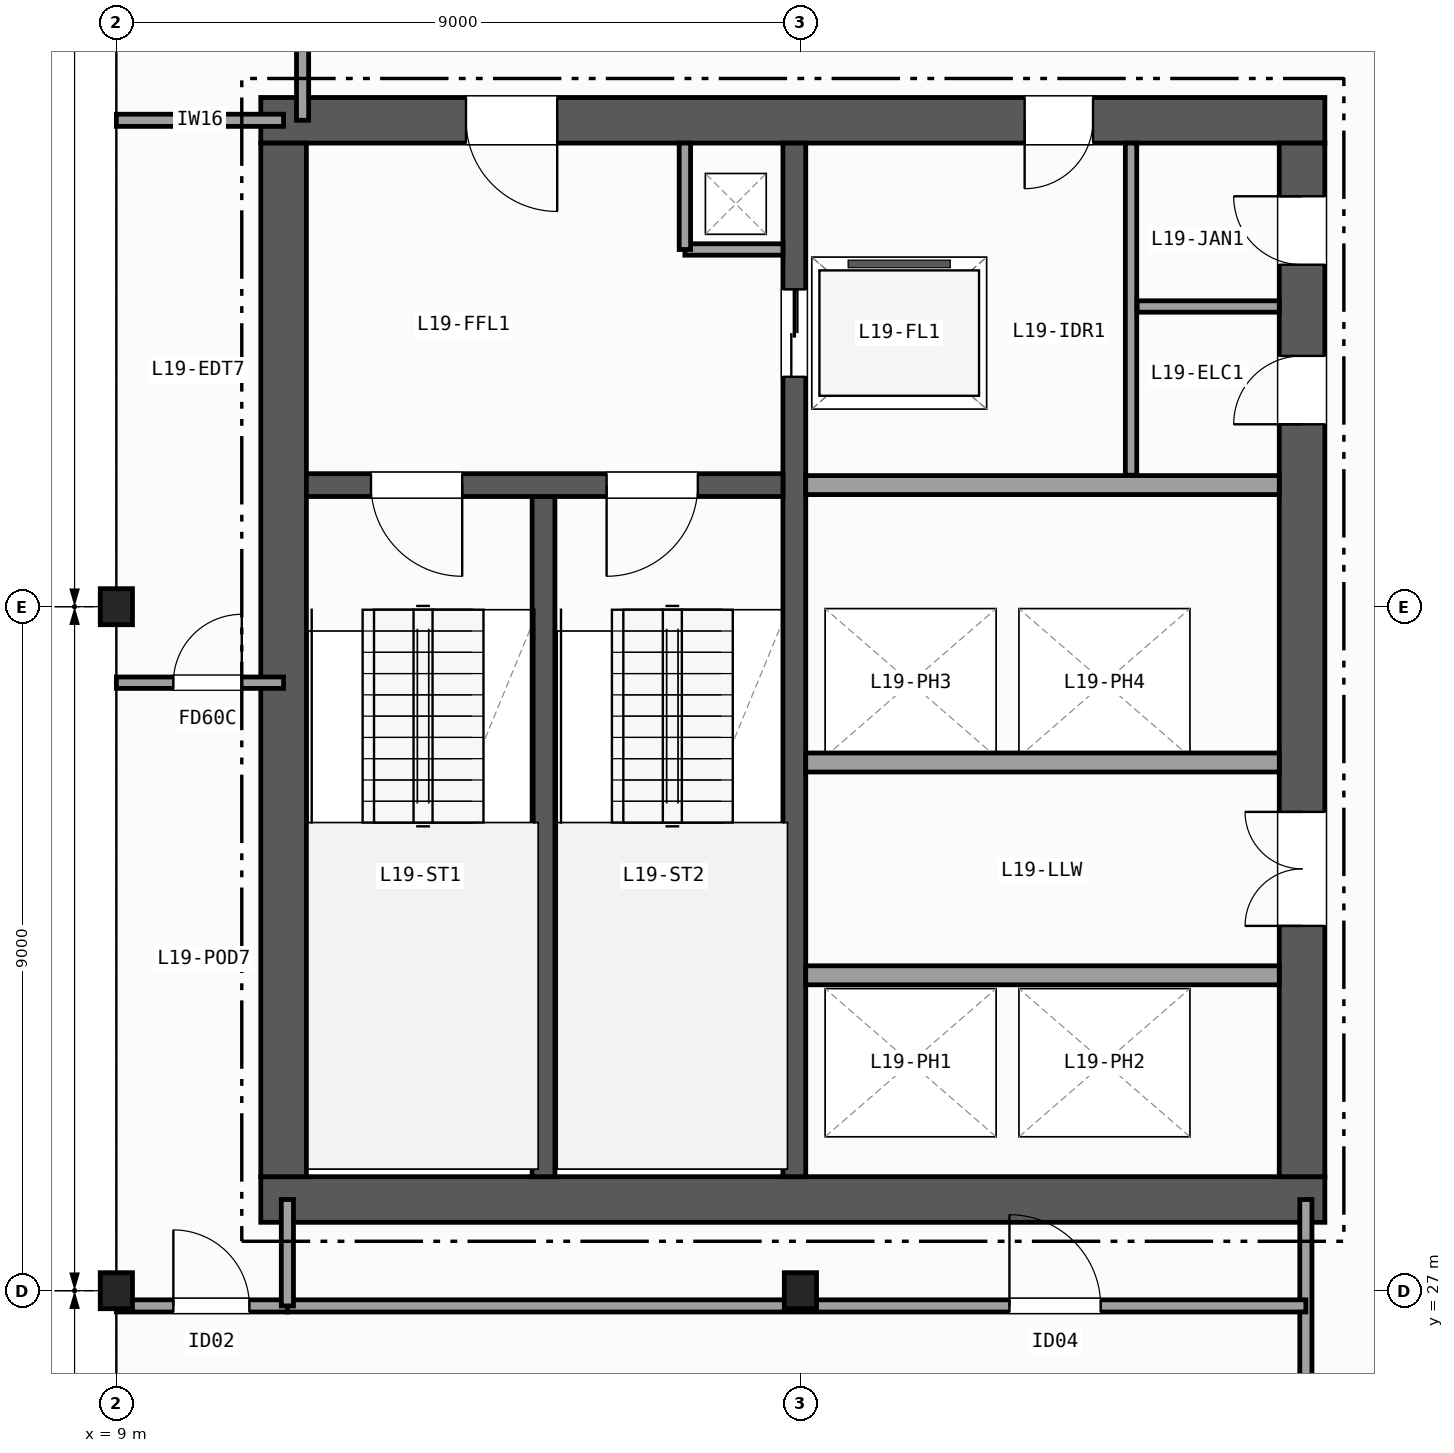
"""IFC4 building model, lengths in metres.
Left out: names, types, materials, properties, quantities, classifications, styles, units other than length and angle.
Written with IfcOpenShell. Run it as: python <this file> out.ifc"""

import sys

from ifc_helpers import new_model, si_unit, direction, frame, frame_2d, origin, origin_2d, place, context, subcontext, project, spatial, rectangle, i_section, extrude, element, fill, save


model = new_model("IFC4")
c1 = context("Model", 3, precision=1e-05, world=origin(), true_north=direction((0.0, 1.0)))
c2 = subcontext(c1, "Body", "Model", "MODEL_VIEW")
j1 = project(units=[si_unit("LENGTHUNIT", "METRE"), si_unit("PLANEANGLEUNIT", "RADIAN")], contexts=[c1])
p1 = place(None, origin())
s1 = spatial("IfcSite", under=j1, at=p1, CompositionType="ELEMENT")
p2 = place(p1, origin())
s2 = spatial("IfcBuilding", under=s1, at=p2, CompositionType="ELEMENT")
p3 = place(p2, frame((0.0, 0.0, 80.4)))
s3 = spatial("IfcBuildingStorey", under=s2, at=p3, CompositionType="ELEMENT", Elevation=80.4)
for number, where, z_axis, x_axis in (
    (1, (9.0, 27.0, 0.0), (0.0, 0.0, 1.0), (1.0, 0.0, 0.0)),
    (2, (9.0, 36.0, 0.0), (0.0, 0.0, 1.0), (1.0, 0.0, 0.0)),
    (3, (18.0, 27.0, 0.0), (0.0, 0.0, 1.0), (1.0, 0.0, 0.0)),
):
    element("IfcColumn", number, at=place(p3, frame(where, z_axis=z_axis, x_axis=x_axis)), inside=s3, PredefinedType="COLUMN", context=c2, shape_type="SweptSolid", body=[
        extrude(i_section(OverallWidth=0.424, OverallDepth=0.474, WebThickness=0.048, FlangeThickness=0.077, FilletRadius=0.015, at=origin_2d()), origin(), (0.0, 0.0, 1.0), 3.7),
    ])
p4 = place(p3, frame((10.9, 28.2, 0.0), z_axis=(0.0, 0.0, 1.0), x_axis=(1.0, 0.0, 0.0)))
e4 = element("IfcWall", 4, at=p4, inside=s3, PredefinedType="SHEAR", context=c2, shape_type="SweptSolid", body=[
    extrude(rectangle(XDim=14.0, YDim=0.6, at=frame_2d((7.0, 0.0))), origin(), (0.0, 0.0, 1.0), 3.37),
])
p5 = place(p3, frame((24.9, 42.4, 0.0), z_axis=(0.0, 0.0, 1.0), x_axis=(-1.0, 0.0, 0.0)))
e5 = element("IfcWall", 5, at=p5, inside=s3, PredefinedType="SHEAR", context=c2, shape_type="SweptSolid", body=[
    extrude(rectangle(XDim=14.0, YDim=0.6, at=frame_2d((7.0, 0.0))), origin(), (0.0, 0.0, 1.0), 3.37),
])
p6 = place(p5, frame((10.1, 0.0, 0.0)))
e6 = element("IfcOpeningElement", 6, at=p6, cuts=e5, PredefinedType="OPENING", context=c2, shape_type="SweptSolid", body=[
    extrude(rectangle(XDim=1.2, YDim=2.15, at=frame_2d((0.6, 1.075))), frame((0.0, 0.31, 0.0), z_axis=(0.0, -1.0, 0.0), x_axis=(1.0, 0.0, 0.0)), (0.0, 0.0, 1.0), 0.62),
])
p7 = place(p5, frame((3.05, 0.0, 0.0)))
e7 = element("IfcOpeningElement", 7, at=p7, cuts=e5, PredefinedType="OPENING", context=c2, shape_type="SweptSolid", body=[
    extrude(rectangle(XDim=0.9, YDim=2.1, at=frame_2d((0.45, 1.05))), frame((0.0, 0.31, 0.0), z_axis=(0.0, -1.0, 0.0), x_axis=(1.0, 0.0, 0.0)), (0.0, 0.0, 1.0), 0.62),
])
p8 = place(p3, frame((11.2, 42.1, 0.0), z_axis=(0.0, 0.0, 1.0), x_axis=(0.0, -1.0, 0.0)))
e8 = element("IfcWall", 8, at=p8, inside=s3, PredefinedType="SHEAR", context=c2, shape_type="SweptSolid", body=[
    extrude(rectangle(XDim=13.6, YDim=0.6, at=frame_2d((6.8, 0.0))), origin(), (0.0, 0.0, 1.0), 3.37),
])
p9 = place(p3, frame((24.6, 28.5, 0.0), z_axis=(0.0, 0.0, 1.0), x_axis=(0.0, 1.0, 0.0)))
e9 = element("IfcWall", 9, at=p9, inside=s3, PredefinedType="SHEAR", context=c2, shape_type="SweptSolid", body=[
    extrude(rectangle(XDim=13.6, YDim=0.6, at=frame_2d((6.8, 0.0))), origin(), (0.0, 0.0, 1.0), 3.37),
])
p10 = place(p9, frame((3.3, 0.0, 0.0)))
e10 = element("IfcOpeningElement", 10, at=p10, cuts=e9, PredefinedType="OPENING", context=c2, shape_type="SweptSolid", body=[
    extrude(rectangle(XDim=1.5, YDim=2.2, at=frame_2d((0.75, 1.1))), frame((0.0, 0.31, 0.0), z_axis=(0.0, -1.0, 0.0), x_axis=(1.0, 0.0, 0.0)), (0.0, 0.0, 1.0), 0.62),
])
p11 = place(p9, frame((9.9, 0.0, 0.0)))
e11 = element("IfcOpeningElement", 11, at=p11, cuts=e9, PredefinedType="OPENING", context=c2, shape_type="SweptSolid", body=[
    extrude(rectangle(XDim=0.9, YDim=2.1, at=frame_2d((0.45, 1.05))), frame((0.0, 0.31, 0.0), z_axis=(0.0, -1.0, 0.0), x_axis=(1.0, 0.0, 0.0)), (0.0, 0.0, 1.0), 0.62),
])
p12 = place(p9, frame((12.0, 0.0, 0.0)))
e12 = element("IfcOpeningElement", 12, at=p12, cuts=e9, PredefinedType="OPENING", context=c2, shape_type="SweptSolid", body=[
    extrude(rectangle(XDim=0.9, YDim=2.1, at=frame_2d((0.45, 1.05))), frame((0.0, 0.31, 0.0), z_axis=(0.0, -1.0, 0.0), x_axis=(1.0, 0.0, 0.0)), (0.0, 0.0, 1.0), 0.62),
])
p13 = place(p3, frame((14.62, 28.5, 0.0), z_axis=(0.0, 0.0, 1.0), x_axis=(0.0, 1.0, 0.0)))
e13 = element("IfcWall", 13, at=p13, inside=s3, PredefinedType="SHEAR", context=c2, shape_type="SweptSolid", body=[
    extrude(rectangle(XDim=8.95, YDim=0.3, at=frame_2d((4.475, 0.0))), origin(), (0.0, 0.0, 1.0), 3.37),
])
p14 = place(p3, frame((17.92, 42.1, 0.0), z_axis=(0.0, 0.0, 1.0), x_axis=(0.0, -1.0, 0.0)))
e14 = element("IfcWall", 14, at=p14, inside=s3, PredefinedType="SHEAR", context=c2, shape_type="SweptSolid", body=[
    extrude(rectangle(XDim=13.6, YDim=0.3, at=frame_2d((6.8, 0.0))), origin(), (0.0, 0.0, 1.0), 3.37),
])
p15 = place(p14, frame((1.925, 0.0, 0.0)))
e15 = element("IfcOpeningElement", 15, at=p15, cuts=e14, PredefinedType="OPENING", context=c2, shape_type="SweptSolid", body=[
    extrude(rectangle(XDim=1.15, YDim=2.15, at=frame_2d((0.575, 1.075))), frame((0.0, 0.16, 0.0), z_axis=(0.0, -1.0, 0.0), x_axis=(1.0, 0.0, 0.0)), (0.0, 0.0, 1.0), 0.32),
])
p16 = place(p3, frame((17.77, 37.6, 0.0), z_axis=(0.0, 0.0, 1.0), x_axis=(-1.0, 0.0, 0.0)))
e16 = element("IfcWall", 16, at=p16, inside=s3, PredefinedType="SHEAR", context=c2, shape_type="SweptSolid", body=[
    extrude(rectangle(XDim=6.27, YDim=0.3, at=frame_2d((3.135, 0.0))), origin(), (0.0, 0.0, 1.0), 3.37),
])
p17 = place(p16, frame((4.22, 0.0, 0.0)))
e17 = element("IfcOpeningElement", 17, at=p17, cuts=e16, PredefinedType="OPENING", context=c2, shape_type="SweptSolid", body=[
    extrude(rectangle(XDim=1.2, YDim=2.15, at=frame_2d((0.6, 1.075))), frame((0.0, 0.16, 0.0), z_axis=(0.0, -1.0, 0.0), x_axis=(1.0, 0.0, 0.0)), (0.0, 0.0, 1.0), 0.32),
])
p18 = place(p16, frame((1.12, 0.0, 0.0)))
e18 = element("IfcOpeningElement", 18, at=p18, cuts=e16, PredefinedType="OPENING", context=c2, shape_type="SweptSolid", body=[
    extrude(rectangle(XDim=1.2, YDim=2.15, at=frame_2d((0.6, 1.075))), frame((0.0, 0.16, 0.0), z_axis=(0.0, -1.0, 0.0), x_axis=(1.0, 0.0, 0.0)), (0.0, 0.0, 1.0), 0.32),
])
p19 = place(p3, frame((16.48, 40.7, 0.0), z_axis=(0.0, 0.0, 1.0), x_axis=(1.0, 0.0, 0.0)))
e19 = element("IfcWall", 19, at=p19, inside=s3, PredefinedType="PARTITIONING", context=c2, shape_type="SweptSolid", body=[
    extrude(rectangle(XDim=1.29, YDim=0.15, at=frame_2d((0.645, 0.0))), origin(), (0.0, 0.0, 1.0), 3.37),
])
p20 = place(p3, frame((16.48, 40.7, 0.0), z_axis=(0.0, 0.0, 1.0), x_axis=(0.0, 1.0, 0.0)))
e20 = element("IfcWall", 20, at=p20, inside=s3, PredefinedType="PARTITIONING", context=c2, shape_type="SweptSolid", body=[
    extrude(rectangle(XDim=1.4, YDim=0.15, at=frame_2d((0.7, 0.0))), origin(), (0.0, 0.0, 1.0), 3.37),
])
for number, where, z_axis, x_axis in (
    (21, (18.07, 37.6, 0.0), (0.0, 0.0, 1.0), (1.0, 0.0, 0.0)),
    (22, (18.07, 31.15, 0.0), (0.0, 0.0, 1.0), (1.0, 0.0, 0.0)),
    (23, (24.3, 33.95, 0.0), (0.0, 0.0, 1.0), (-1.0, 0.0, 0.0)),
):
    element("IfcWall", number, at=place(p3, frame(where, z_axis=z_axis, x_axis=x_axis)), inside=s3, PredefinedType="PARTITIONING", context=c2, shape_type="SweptSolid", body=[
        extrude(rectangle(XDim=6.23, YDim=0.25, at=frame_2d((3.115, 0.0))), origin(), (0.0, 0.0, 1.0), 3.37),
    ])
p21 = place(p3, frame((22.35, 37.73, 0.0), z_axis=(0.0, 0.0, 1.0), x_axis=(0.0, 1.0, 0.0)))
e24 = element("IfcWall", 24, at=p21, inside=s3, PredefinedType="PARTITIONING", context=c2, shape_type="SweptSolid", body=[
    extrude(rectangle(XDim=4.37, YDim=0.15, at=frame_2d((2.185, 0.0))), origin(), (0.0, 0.0, 1.0), 3.37),
])
p22 = place(p3, frame((22.43, 39.95, 0.0), z_axis=(0.0, 0.0, 1.0), x_axis=(1.0, 0.0, 0.0)))
e25 = element("IfcWall", 25, at=p22, inside=s3, PredefinedType="PARTITIONING", context=c2, shape_type="SweptSolid", body=[
    extrude(rectangle(XDim=1.87, YDim=0.15, at=frame_2d((0.935, 0.0))), origin(), (0.0, 0.0, 1.0), 3.37),
])
p23 = place(p3, frame((9.0, 26.8, 0.0), z_axis=(0.0, 0.0, 1.0), x_axis=(1.0, 0.0, 0.0)))
e26 = element("IfcWall", 26, at=p23, inside=s3, PredefinedType="PARTITIONING", context=c2, shape_type="SweptSolid", body=[
    extrude(rectangle(XDim=2.25, YDim=0.16, at=frame_2d((1.125, 0.0))), origin(), (0.0, 0.0, 1.0), 2.577),
])
p24 = place(p23, frame((0.75, 0.0, 0.0)))
e27 = element("IfcOpeningElement", 27, at=p24, cuts=e26, PredefinedType="OPENING", context=c2, shape_type="SweptSolid", body=[
    extrude(rectangle(XDim=1.0, YDim=2.1, at=frame_2d((0.5, 1.05))), frame((0.0, 0.09, 0.0), z_axis=(0.0, -1.0, 0.0), x_axis=(1.0, 0.0, 0.0)), (0.0, 0.0, 1.0), 0.18),
])
p25 = place(p3, frame((9.0, 42.4, 0.0), z_axis=(0.0, 0.0, 1.0), x_axis=(1.0, 0.0, 0.0)))
e28 = element("IfcWall", 28, at=p25, inside=s3, PredefinedType="PARTITIONING", context=c2, shape_type="SweptSolid", body=[
    extrude(rectangle(XDim=2.2, YDim=0.16, at=frame_2d((1.1, 0.0))), origin(), (0.0, 0.0, 1.0), 2.577),
])
p26 = place(p3, frame((11.45, 42.4, 0.0), z_axis=(0.0, 0.0, 1.0), x_axis=(0.0, 1.0, 0.0)))
e29 = element("IfcWall", 29, at=p26, inside=s3, PredefinedType="PARTITIONING", context=c2, shape_type="SweptSolid", body=[
    extrude(rectangle(XDim=2.1, YDim=0.16, at=frame_2d((1.05, 0.0))), origin(), (0.0, 0.0, 1.0), 3.37),
])
p27 = place(p3, frame((9.0, 35.0, 0.0), z_axis=(0.0, 0.0, 1.0), x_axis=(1.0, 0.0, 0.0)))
e30 = element("IfcWall", 30, at=p27, inside=s3, PredefinedType="PARTITIONING", context=c2, shape_type="SweptSolid", body=[
    extrude(rectangle(XDim=2.2, YDim=0.15, at=frame_2d((1.1, 0.0))), origin(), (0.0, 0.0, 1.0), 2.577),
])
p28 = place(p27, frame((0.75, 0.0, 0.0)))
e31 = element("IfcOpeningElement", 31, at=p28, cuts=e30, PredefinedType="OPENING", context=c2, shape_type="SweptSolid", body=[
    extrude(rectangle(XDim=0.9, YDim=2.1, at=frame_2d((0.45, 1.05))), frame((0.0, 0.085, 0.0), z_axis=(0.0, -1.0, 0.0), x_axis=(1.0, 0.0, 0.0)), (0.0, 0.0, 1.0), 0.17),
])
p29 = place(p3, frame((24.65, 9.0, 0.0), z_axis=(0.0, 0.0, 1.0), x_axis=(0.0, 1.0, 0.0)))
e32 = element("IfcWall", 32, at=p29, inside=s3, PredefinedType="PARTITIONING", context=c2, shape_type="SweptSolid", body=[
    extrude(rectangle(XDim=19.2, YDim=0.16, at=frame_2d((9.6, 0.0))), origin(), (0.0, 0.0, 1.0), 2.577),
])
p30 = place(p29, frame((2.8, 0.0, 0.0)))
e33 = element("IfcOpeningElement", 33, at=p30, cuts=e32, PredefinedType="OPENING", context=c2, shape_type="SweptSolid", body=[
    extrude(rectangle(XDim=0.86, YDim=2.05, at=frame_2d((0.43, 1.025))), frame((0.0, 0.09, 0.0), z_axis=(0.0, -1.0, 0.0), x_axis=(1.0, 0.0, 0.0)), (0.0, 0.0, 1.0), 0.18),
])
p31 = place(p29, frame((8.95, 0.0, 0.0)))
e34 = element("IfcOpeningElement", 34, at=p31, cuts=e32, PredefinedType="OPENING", context=c2, shape_type="SweptSolid", body=[
    extrude(rectangle(XDim=0.95, YDim=2.1, at=frame_2d((0.475, 1.05))), frame((0.0, 0.09, 0.0), z_axis=(0.0, -1.0, 0.0), x_axis=(1.0, 0.0, 0.0)), (0.0, 0.0, 1.0), 0.18),
])
p32 = place(p29, frame((13.44, 0.0, 0.0)))
e35 = element("IfcOpeningElement", 35, at=p32, cuts=e32, PredefinedType="OPENING", context=c2, shape_type="SweptSolid", body=[
    extrude(rectangle(XDim=1.0, YDim=2.1, at=frame_2d((0.5, 1.05))), frame((0.0, 0.09, 0.0), z_axis=(0.0, -1.0, 0.0), x_axis=(1.0, 0.0, 0.0)), (0.0, 0.0, 1.0), 0.18),
])
p33 = place(p3, frame((11.25, 26.8, 0.0), z_axis=(0.0, 0.0, 1.0), x_axis=(1.0, 0.0, 0.0)))
e36 = element("IfcWall", 36, at=p33, inside=s3, PredefinedType="PARTITIONING", context=c2, shape_type="SweptSolid", body=[
    extrude(rectangle(XDim=13.4, YDim=0.16, at=frame_2d((6.7, 0.0))), origin(), (0.0, 0.0, 1.0), 2.739),
])
p34 = place(p33, frame((9.5, 0.0, 0.0)))
e37 = element("IfcOpeningElement", 37, at=p34, cuts=e36, PredefinedType="OPENING", context=c2, shape_type="SweptSolid", body=[
    extrude(rectangle(XDim=1.2, YDim=2.15, at=frame_2d((0.6, 1.075))), frame((0.0, 0.09, 0.0), z_axis=(0.0, -1.0, 0.0), x_axis=(1.0, 0.0, 0.0)), (0.0, 0.0, 1.0), 0.18),
])
p35 = place(p3, frame((11.25, 26.8, 0.0), z_axis=(0.0, 0.0, 1.0), x_axis=(0.0, 1.0, 0.0)))
e38 = element("IfcWall", 38, at=p35, inside=s3, PredefinedType="PARTITIONING", context=c2, shape_type="SweptSolid", body=[
    extrude(rectangle(XDim=1.4, YDim=0.16, at=frame_2d((0.7, 0.0))), origin(), (0.0, 0.0, 1.0), 2.739),
])
p36 = place(p17, origin())
e39 = element("IfcDoor", 39, at=p36, inside=s3, OperationType="SINGLE_SWING_LEFT", PredefinedType="DOOR", context=c2, shape_type="SweptSolid", body=[
    extrude(rectangle(XDim=1.2, YDim=2.15, at=frame_2d((0.6, 1.075))), frame((0.0, 0.025, 0.0), z_axis=(0.0, -1.0, 0.0), x_axis=(1.0, 0.0, 0.0)), (0.0, 0.0, 1.0), 0.05),
])
fill(e17, e39)
p37 = place(p18, origin())
e40 = element("IfcDoor", 40, at=p37, inside=s3, OperationType="SINGLE_SWING_RIGHT", PredefinedType="DOOR", context=c2, shape_type="SweptSolid", body=[
    extrude(rectangle(XDim=1.2, YDim=2.15, at=frame_2d((0.6, 1.075))), frame((0.0, 0.025, 0.0), z_axis=(0.0, -1.0, 0.0), x_axis=(1.0, 0.0, 0.0)), (0.0, 0.0, 1.0), 0.05),
])
fill(e18, e40)
p38 = place(p10, origin())
e41 = element("IfcDoor", 41, at=p38, inside=s3, OperationType="DOUBLE_DOOR_SINGLE_SWING", PredefinedType="DOOR", context=c2, shape_type="SweptSolid", body=[
    extrude(rectangle(XDim=1.5, YDim=2.2, at=frame_2d((0.75, 1.1))), frame((0.0, 0.025, 0.0), z_axis=(0.0, -1.0, 0.0), x_axis=(1.0, 0.0, 0.0)), (0.0, 0.0, 1.0), 0.05),
])
fill(e10, e41)
p39 = place(p6, origin())
e42 = element("IfcDoor", 42, at=p39, inside=s3, OperationType="SINGLE_SWING_LEFT", PredefinedType="DOOR", context=c2, shape_type="SweptSolid", body=[
    extrude(rectangle(XDim=1.2, YDim=2.15, at=frame_2d((0.6, 1.075))), frame((0.0, 0.025, 0.0), z_axis=(0.0, -1.0, 0.0), x_axis=(1.0, 0.0, 0.0)), (0.0, 0.0, 1.0), 0.05),
])
fill(e6, e42)
p40 = place(p11, origin())
e43 = element("IfcDoor", 43, at=p40, inside=s3, OperationType="SINGLE_SWING_LEFT", PredefinedType="DOOR", context=c2, shape_type="SweptSolid", body=[
    extrude(rectangle(XDim=0.9, YDim=2.1, at=frame_2d((0.45, 1.05))), frame((0.0, 0.025, 0.0), z_axis=(0.0, -1.0, 0.0), x_axis=(1.0, 0.0, 0.0)), (0.0, 0.0, 1.0), 0.05),
])
fill(e11, e43)
p41 = place(p7, origin())
e44 = element("IfcDoor", 44, at=p41, inside=s3, OperationType="SINGLE_SWING_RIGHT", PredefinedType="DOOR", context=c2, shape_type="SweptSolid", body=[
    extrude(rectangle(XDim=0.9, YDim=2.1, at=frame_2d((0.45, 1.05))), frame((0.0, 0.025, 0.0), z_axis=(0.0, -1.0, 0.0), x_axis=(1.0, 0.0, 0.0)), (0.0, 0.0, 1.0), 0.05),
])
fill(e7, e44)
p42 = place(p12, origin())
e45 = element("IfcDoor", 45, at=p42, inside=s3, OperationType="SINGLE_SWING_RIGHT", PredefinedType="DOOR", context=c2, shape_type="SweptSolid", body=[
    extrude(rectangle(XDim=0.9, YDim=2.1, at=frame_2d((0.45, 1.05))), frame((0.0, 0.025, 0.0), z_axis=(0.0, -1.0, 0.0), x_axis=(1.0, 0.0, 0.0)), (0.0, 0.0, 1.0), 0.05),
])
fill(e12, e45)
p43 = place(p15, origin())
e46 = element("IfcDoor", 46, at=p43, inside=s3, OperationType="DOUBLE_DOOR_SLIDING", PredefinedType="DOOR", context=c2, shape_type="SweptSolid", body=[
    extrude(rectangle(XDim=1.15, YDim=2.15, at=frame_2d((0.575, 1.075))), frame((0.0, 0.025, 0.0), z_axis=(0.0, -1.0, 0.0), x_axis=(1.0, 0.0, 0.0)), (0.0, 0.0, 1.0), 0.05),
])
fill(e15, e46)
p44 = place(p24, origin())
e47 = element("IfcDoor", 47, at=p44, inside=s3, OperationType="SINGLE_SWING_LEFT", PredefinedType="DOOR", context=c2, shape_type="SweptSolid", body=[
    extrude(rectangle(XDim=1.0, YDim=2.1, at=frame_2d((0.5, 1.05))), frame((0.0, 0.025, 0.0), z_axis=(0.0, -1.0, 0.0), x_axis=(1.0, 0.0, 0.0)), (0.0, 0.0, 1.0), 0.05),
])
fill(e27, e47)
p45 = place(p28, origin())
e48 = element("IfcDoor", 48, at=p45, inside=s3, OperationType="SINGLE_SWING_RIGHT", PredefinedType="DOOR", context=c2, shape_type="SweptSolid", body=[
    extrude(rectangle(XDim=0.9, YDim=2.1, at=frame_2d((0.45, 1.05))), frame((0.0, 0.025, 0.0), z_axis=(0.0, -1.0, 0.0), x_axis=(1.0, 0.0, 0.0)), (0.0, 0.0, 1.0), 0.05),
])
fill(e31, e48)
p46 = place(p34, origin())
e49 = element("IfcDoor", 49, at=p46, inside=s3, OperationType="SINGLE_SWING_LEFT", PredefinedType="DOOR", context=c2, shape_type="SweptSolid", body=[
    extrude(rectangle(XDim=1.2, YDim=2.15, at=frame_2d((0.6, 1.075))), frame((0.0, 0.025, 0.0), z_axis=(0.0, -1.0, 0.0), x_axis=(1.0, 0.0, 0.0)), (0.0, 0.0, 1.0), 0.05),
])
fill(e37, e49)
save(model, sys.argv[1])
